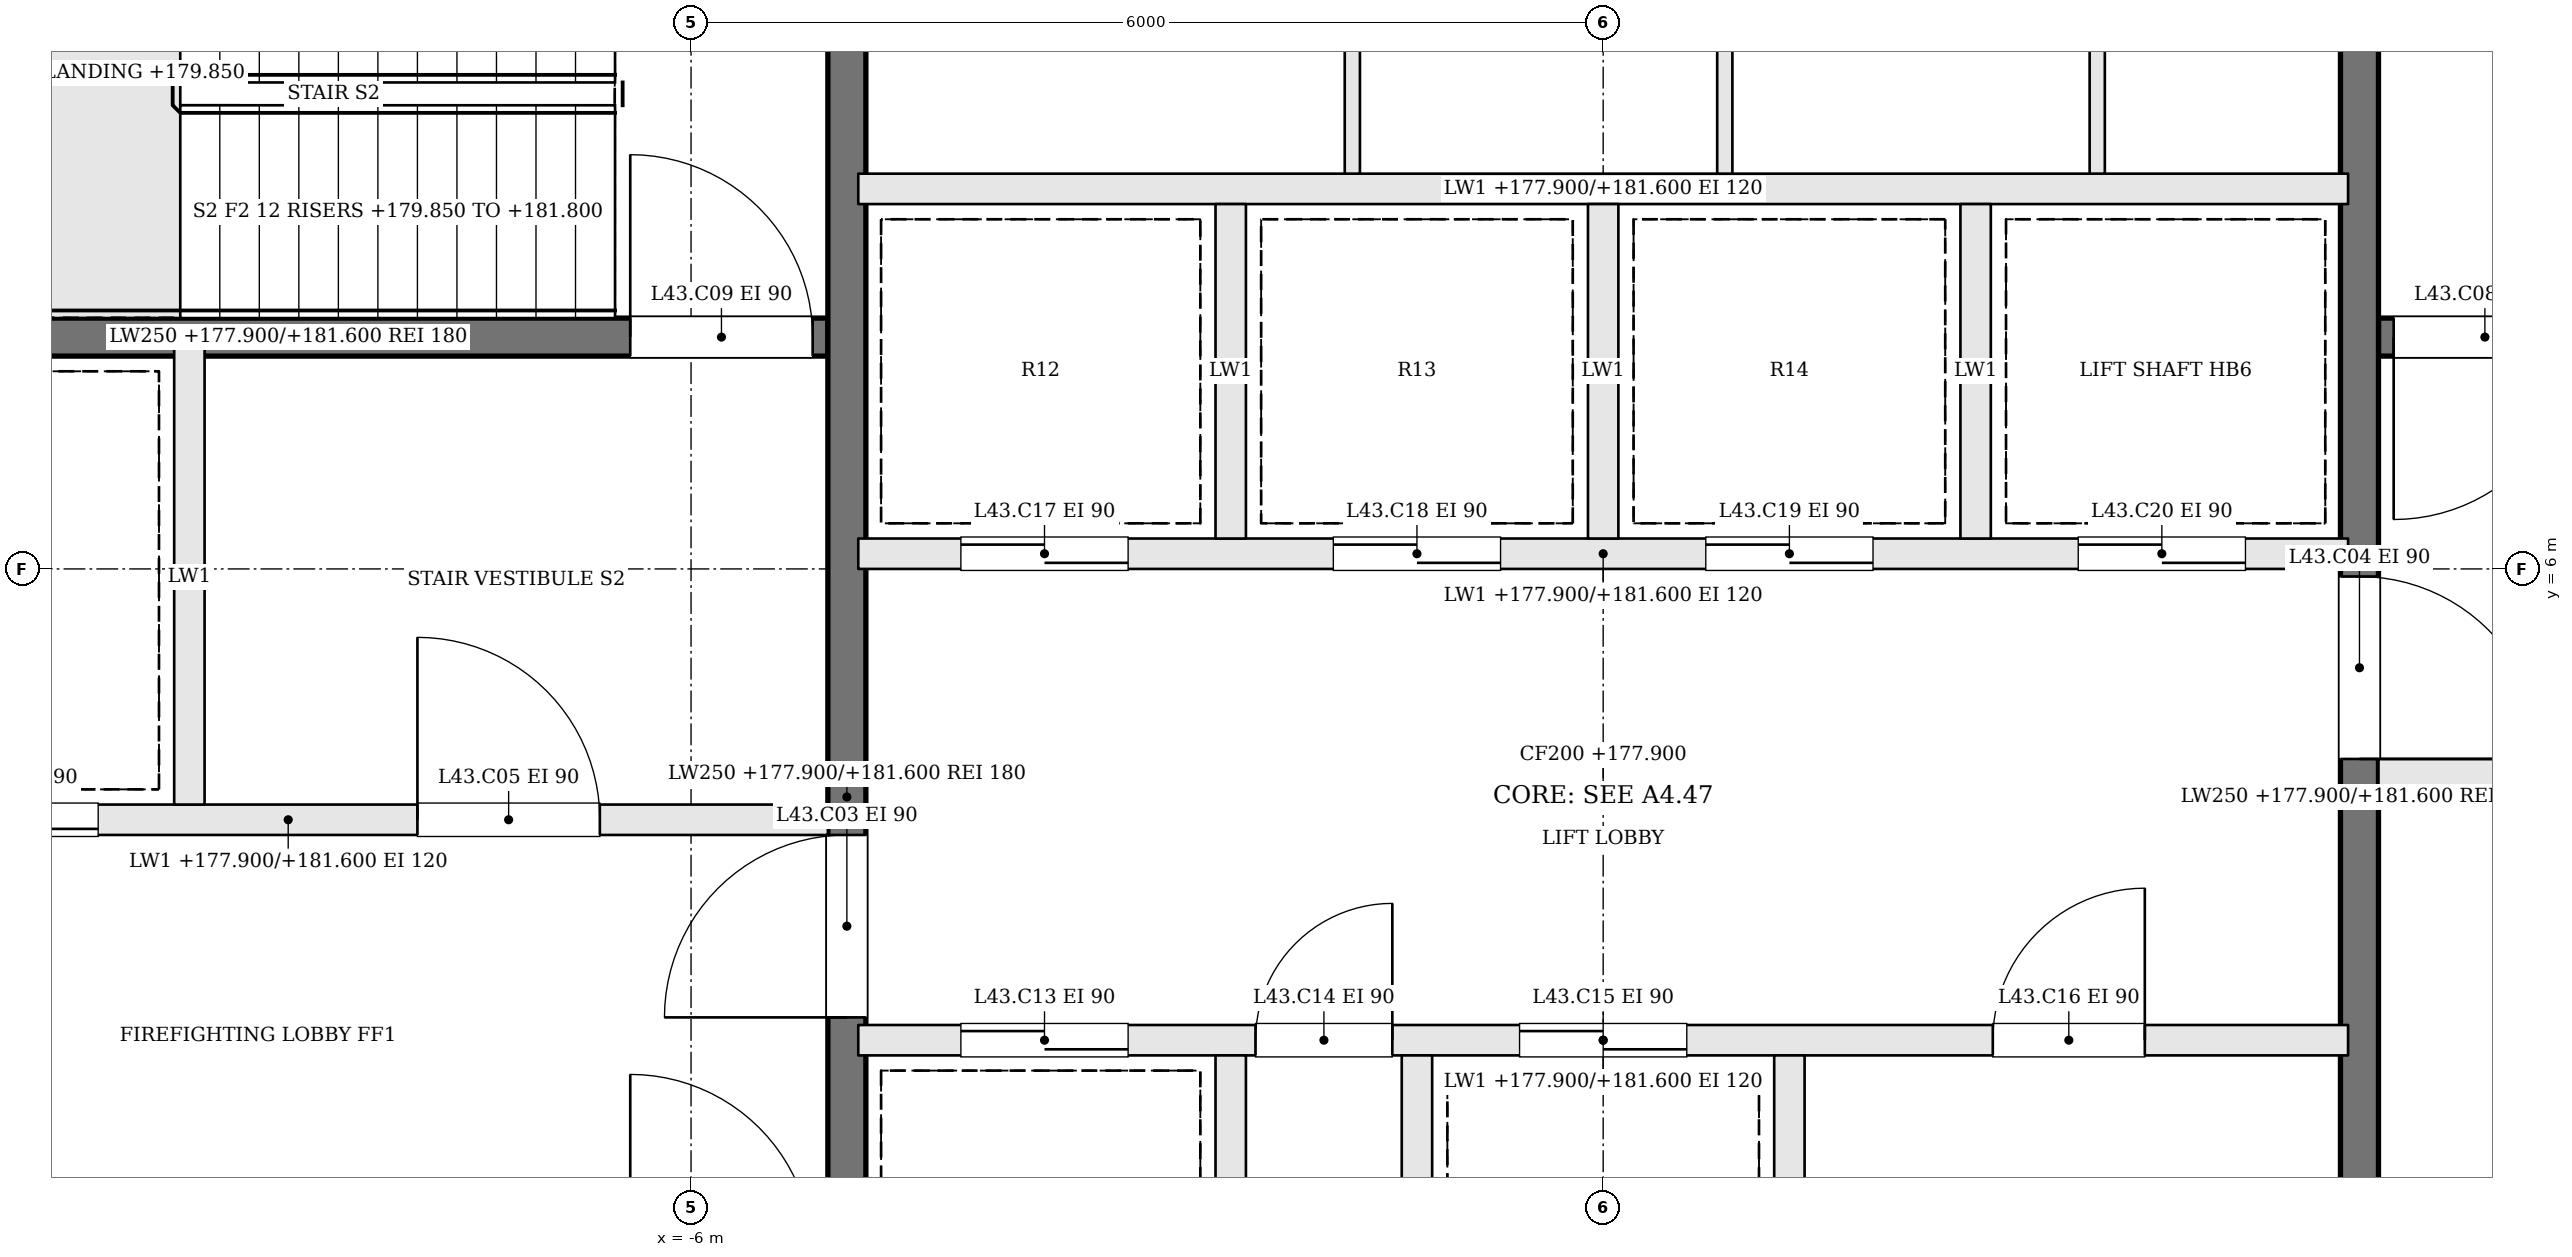
"""IFC4 building model, lengths in metres.
Left out: names, types, materials, properties, quantities, classifications, styles, units other than length and angle.
Written with IfcOpenShell. Run it as: python <this file> out.ifc"""

import sys

from ifc_helpers import new_model, si_unit, direction, frame, frame_2d, origin, place, context, subcontext, project, spatial, rectangle, extrude, element, fill, save


model = new_model("IFC4")
c1 = context("Model", 3, precision=1e-05, world=origin(), true_north=direction((0.0, 1.0)))
c2 = subcontext(c1, "Body", "Model", "MODEL_VIEW")
j1 = project(units=[si_unit("LENGTHUNIT", "METRE"), si_unit("PLANEANGLEUNIT", "RADIAN")], contexts=[c1])
p1 = place(None, origin())
s1 = spatial("IfcSite", under=j1, at=p1, CompositionType="ELEMENT")
p2 = place(p1, origin())
s2 = spatial("IfcBuilding", under=s1, at=p2, CompositionType="ELEMENT")
p3 = place(p2, frame((0.0, 0.0, 177.9)))
s3 = spatial("IfcBuildingStorey", under=s2, at=p3, CompositionType="ELEMENT", Elevation=177.9)
p4 = place(p3, frame((12.2, 7.525, 0.0), z_axis=(0.0, 0.0, 1.0), x_axis=(-1.0, 0.0, 0.0)))
e1 = element("IfcWall", 1, at=p4, inside=s3, PredefinedType="SOLIDWALL", context=c2, shape_type="SweptSolid", body=[
    extrude(rectangle(XDim=7.1, YDim=0.25, at=frame_2d((3.55, 0.0))), origin(), (0.0, 0.0, 1.0), 3.7),
])
p5 = place(p4, frame((5.8, 0.0, 0.0)))
e2 = element("IfcOpeningElement", 2, at=p5, cuts=e1, PredefinedType="OPENING", context=c2, shape_type="SweptSolid", body=[
    extrude(rectangle(XDim=1.2, YDim=2.1, at=frame_2d((0.6, 1.05))), frame((0.0, 0.135, 0.0), z_axis=(0.0, -1.0, 0.0), x_axis=(1.0, 0.0, 0.0)), (0.0, 0.0, 1.0), 0.27),
])
p6 = place(p3, frame((-12.2, 4.35, 0.0), z_axis=(0.0, 0.0, 1.0), x_axis=(1.0, 0.0, 0.0)))
e3 = element("IfcWall", 3, at=p6, inside=s3, PredefinedType="SOLIDWALL", context=c2, shape_type="SweptSolid", body=[
    extrude(rectangle(XDim=7.1, YDim=0.2, at=frame_2d((3.55, 0.0))), origin(), (0.0, 0.0, 1.0), 3.7),
])
p7 = place(p6, frame((4.4, 0.0, 0.0)))
e4 = element("IfcOpeningElement", 4, at=p7, cuts=e3, PredefinedType="OPENING", context=c2, shape_type="SweptSolid", body=[
    extrude(rectangle(XDim=1.2, YDim=2.1, at=frame_2d((0.6, 1.05))), frame((0.0, 0.11, 0.0), z_axis=(0.0, -1.0, 0.0), x_axis=(1.0, 0.0, 0.0)), (0.0, 0.0, 1.0), 0.22),
])
p8 = place(p6, frame((1.1, 0.0, 0.0)))
e5 = element("IfcOpeningElement", 5, at=p8, cuts=e3, PredefinedType="OPENING", context=c2, shape_type="SweptSolid", body=[
    extrude(rectangle(XDim=1.2, YDim=2.1, at=frame_2d((0.6, 1.05))), frame((0.0, 0.11, 0.0), z_axis=(0.0, -1.0, 0.0), x_axis=(1.0, 0.0, 0.0)), (0.0, 0.0, 1.0), 0.22),
])
p9 = place(p3, frame((12.2, 4.65, 0.0), z_axis=(0.0, 0.0, 1.0), x_axis=(-1.0, 0.0, 0.0)))
e6 = element("IfcWall", 6, at=p9, inside=s3, PredefinedType="SOLIDWALL", context=c2, shape_type="SweptSolid", body=[
    extrude(rectangle(XDim=7.1, YDim=0.2, at=frame_2d((3.55, 0.0))), origin(), (0.0, 0.0, 1.0), 3.7),
])
p10 = place(p9, frame((4.4, 0.0, 0.0)))
e7 = element("IfcOpeningElement", 7, at=p10, cuts=e6, PredefinedType="OPENING", context=c2, shape_type="SweptSolid", body=[
    extrude(rectangle(XDim=1.2, YDim=2.1, at=frame_2d((0.6, 1.05))), frame((0.0, 0.11, 0.0), z_axis=(0.0, -1.0, 0.0), x_axis=(1.0, 0.0, 0.0)), (0.0, 0.0, 1.0), 0.22),
])
p11 = place(p9, frame((1.1, 0.0, 0.0)))
e8 = element("IfcOpeningElement", 8, at=p11, cuts=e6, PredefinedType="OPENING", context=c2, shape_type="SweptSolid", body=[
    extrude(rectangle(XDim=1.2, YDim=2.1, at=frame_2d((0.6, 1.05))), frame((0.0, 0.11, 0.0), z_axis=(0.0, -1.0, 0.0), x_axis=(1.0, 0.0, 0.0)), (0.0, 0.0, 1.0), 0.22),
])
p12 = place(p3, frame((-12.2, 7.525, 0.0), z_axis=(0.0, 0.0, 1.0), x_axis=(1.0, 0.0, 0.0)))
e9 = element("IfcWall", 9, at=p12, inside=s3, PredefinedType="SOLIDWALL", context=c2, shape_type="SweptSolid", body=[
    extrude(rectangle(XDim=7.1, YDim=0.25, at=frame_2d((3.55, 0.0))), origin(), (0.0, 0.0, 1.0), 3.7),
])
p13 = place(p12, frame((5.8, 0.0, 0.0)))
e10 = element("IfcOpeningElement", 10, at=p13, cuts=e9, PredefinedType="OPENING", context=c2, shape_type="SweptSolid", body=[
    extrude(rectangle(XDim=1.2, YDim=2.1, at=frame_2d((0.6, 1.05))), frame((0.0, 0.135, 0.0), z_axis=(0.0, -1.0, 0.0), x_axis=(1.0, 0.0, 0.0)), (0.0, 0.0, 1.0), 0.27),
])
p14 = place(p3, frame((-9.3, 4.45, 0.0), z_axis=(0.0, 0.0, 1.0), x_axis=(0.0, 1.0, 0.0)))
e11 = element("IfcWall", 11, at=p14, inside=s3, PredefinedType="SOLIDWALL", context=c2, shape_type="SweptSolid", body=[
    extrude(rectangle(XDim=3.0, YDim=0.2, at=frame_2d((1.5, 0.0))), origin(), (0.0, 0.0, 1.0), 3.7),
])
p15 = place(p3, frame((-4.975, -2.2, 0.0), z_axis=(0.0, 0.0, 1.0), x_axis=(0.0, 1.0, 0.0)))
e12 = element("IfcWall", 12, at=p15, inside=s3, PredefinedType="SOLIDWALL", context=c2, shape_type="SweptSolid", body=[
    extrude(rectangle(XDim=13.4, YDim=0.25, at=frame_2d((6.7, 0.0))), origin(), (0.0, 0.0, 1.0), 3.7),
])
p16 = place(p15, frame((5.25, 0.0, 0.0)))
e13 = element("IfcOpeningElement", 13, at=p16, cuts=e12, PredefinedType="OPENING", context=c2, shape_type="SweptSolid", body=[
    extrude(rectangle(XDim=1.2, YDim=2.1, at=frame_2d((0.6, 1.05))), frame((0.0, 0.135, 0.0), z_axis=(0.0, -1.0, 0.0), x_axis=(1.0, 0.0, 0.0)), (0.0, 0.0, 1.0), 0.27),
])
p17 = place(p3, frame((4.975, 11.2, 0.0), z_axis=(0.0, 0.0, 1.0), x_axis=(0.0, -1.0, 0.0)))
e14 = element("IfcWall", 14, at=p17, inside=s3, PredefinedType="SOLIDWALL", context=c2, shape_type="SweptSolid", body=[
    extrude(rectangle(XDim=13.4, YDim=0.25, at=frame_2d((6.7, 0.0))), origin(), (0.0, 0.0, 1.0), 3.7),
])
p18 = place(p17, frame((5.25, 0.0, 0.0)))
e15 = element("IfcOpeningElement", 15, at=p18, cuts=e14, PredefinedType="OPENING", context=c2, shape_type="SweptSolid", body=[
    extrude(rectangle(XDim=1.2, YDim=2.1, at=frame_2d((0.6, 1.05))), frame((0.0, 0.135, 0.0), z_axis=(0.0, -1.0, 0.0), x_axis=(1.0, 0.0, 0.0)), (0.0, 0.0, 1.0), 0.27),
])
p19 = place(p3, frame((-4.9, 2.9, 0.0), z_axis=(0.0, 0.0, 1.0), x_axis=(1.0, 0.0, 0.0)))
e16 = element("IfcWall", 16, at=p19, inside=s3, PredefinedType="SOLIDWALL", context=c2, shape_type="SweptSolid", body=[
    extrude(rectangle(XDim=9.8, YDim=0.2, at=frame_2d((4.9, 0.0))), origin(), (0.0, 0.0, 1.0), 3.7),
])
p20 = place(p19, frame((0.675, 0.0, 0.0)))
e17 = element("IfcOpeningElement", 17, at=p20, cuts=e16, PredefinedType="OPENING", context=c2, shape_type="SweptSolid", body=[
    extrude(rectangle(XDim=1.1, YDim=2.1, at=frame_2d((0.55, 1.05))), frame((0.0, 0.11, 0.0), z_axis=(0.0, -1.0, 0.0), x_axis=(1.0, 0.0, 0.0)), (0.0, 0.0, 1.0), 0.22),
])
p21 = place(p19, frame((2.613, 0.0, 0.0)))
e18 = element("IfcOpeningElement", 18, at=p21, cuts=e16, PredefinedType="OPENING", context=c2, shape_type="SweptSolid", body=[
    extrude(rectangle(XDim=0.9, YDim=2.1, at=frame_2d((0.45, 1.05))), frame((0.0, 0.11, 0.0), z_axis=(0.0, -1.0, 0.0), x_axis=(1.0, 0.0, 0.0)), (0.0, 0.0, 1.0), 0.22),
])
p22 = place(p19, frame((4.35, 0.0, 0.0)))
e19 = element("IfcOpeningElement", 19, at=p22, cuts=e16, PredefinedType="OPENING", context=c2, shape_type="SweptSolid", body=[
    extrude(rectangle(XDim=1.1, YDim=2.1, at=frame_2d((0.55, 1.05))), frame((0.0, 0.11, 0.0), z_axis=(0.0, -1.0, 0.0), x_axis=(1.0, 0.0, 0.0)), (0.0, 0.0, 1.0), 0.22),
])
p23 = place(p19, frame((7.463, 0.0, 0.0)))
e20 = element("IfcOpeningElement", 20, at=p23, cuts=e16, PredefinedType="OPENING", context=c2, shape_type="SweptSolid", body=[
    extrude(rectangle(XDim=1.0, YDim=2.1, at=frame_2d((0.5, 1.05))), frame((0.0, 0.11, 0.0), z_axis=(0.0, -1.0, 0.0), x_axis=(1.0, 0.0, 0.0)), (0.0, 0.0, 1.0), 0.22),
])
p24 = place(p3, frame((-4.9, 6.1, 0.0), z_axis=(0.0, 0.0, 1.0), x_axis=(1.0, 0.0, 0.0)))
e21 = element("IfcWall", 21, at=p24, inside=s3, PredefinedType="SOLIDWALL", context=c2, shape_type="SweptSolid", body=[
    extrude(rectangle(XDim=9.8, YDim=0.2, at=frame_2d((4.9, 0.0))), origin(), (0.0, 0.0, 1.0), 3.7),
])
p25 = place(p24, frame((0.675, 0.0, 0.0)))
e22 = element("IfcOpeningElement", 22, at=p25, cuts=e21, PredefinedType="OPENING", context=c2, shape_type="SweptSolid", body=[
    extrude(rectangle(XDim=1.1, YDim=2.1, at=frame_2d((0.55, 1.05))), frame((0.0, 0.11, 0.0), z_axis=(0.0, -1.0, 0.0), x_axis=(1.0, 0.0, 0.0)), (0.0, 0.0, 1.0), 0.22),
])
p26 = place(p24, frame((3.125, 0.0, 0.0)))
e23 = element("IfcOpeningElement", 23, at=p26, cuts=e21, PredefinedType="OPENING", context=c2, shape_type="SweptSolid", body=[
    extrude(rectangle(XDim=1.1, YDim=2.1, at=frame_2d((0.55, 1.05))), frame((0.0, 0.11, 0.0), z_axis=(0.0, -1.0, 0.0), x_axis=(1.0, 0.0, 0.0)), (0.0, 0.0, 1.0), 0.22),
])
p27 = place(p24, frame((5.575, 0.0, 0.0)))
e24 = element("IfcOpeningElement", 24, at=p27, cuts=e21, PredefinedType="OPENING", context=c2, shape_type="SweptSolid", body=[
    extrude(rectangle(XDim=1.1, YDim=2.1, at=frame_2d((0.55, 1.05))), frame((0.0, 0.11, 0.0), z_axis=(0.0, -1.0, 0.0), x_axis=(1.0, 0.0, 0.0)), (0.0, 0.0, 1.0), 0.22),
])
p28 = place(p24, frame((8.025, 0.0, 0.0)))
e25 = element("IfcOpeningElement", 25, at=p28, cuts=e21, PredefinedType="OPENING", context=c2, shape_type="SweptSolid", body=[
    extrude(rectangle(XDim=1.1, YDim=2.1, at=frame_2d((0.55, 1.05))), frame((0.0, 0.11, 0.0), z_axis=(0.0, -1.0, 0.0), x_axis=(1.0, 0.0, 0.0)), (0.0, 0.0, 1.0), 0.22),
])
p29 = place(p3, frame((-4.9, 8.5, 0.0), z_axis=(0.0, 0.0, 1.0), x_axis=(1.0, 0.0, 0.0)))
e26 = element("IfcWall", 26, at=p29, inside=s3, PredefinedType="SOLIDWALL", context=c2, shape_type="SweptSolid", body=[
    extrude(rectangle(XDim=9.8, YDim=0.2, at=frame_2d((4.9, 0.0))), origin(), (0.0, 0.0, 1.0), 3.7),
])
for number, where, z_axis, x_axis in (
    (27, (-2.45, 0.6, 0.0), (0.0, 0.0, 1.0), (0.0, 1.0, 0.0)),
    (28, (-1.225, 0.6, 0.0), (0.0, 0.0, 1.0), (0.0, 1.0, 0.0)),
    (29, (1.225, 0.6, 0.0), (0.0, 0.0, 1.0), (0.0, 1.0, 0.0)),
    (30, (-2.45, 6.2, 0.0), (0.0, 0.0, 1.0), (0.0, 1.0, 0.0)),
    (31, (0.0, 6.2, 0.0), (0.0, 0.0, 1.0), (0.0, 1.0, 0.0)),
    (32, (2.45, 6.2, 0.0), (0.0, 0.0, 1.0), (0.0, 1.0, 0.0)),
):
    element("IfcWall", number, at=place(p3, frame(where, z_axis=z_axis, x_axis=x_axis)), inside=s3, PredefinedType="SOLIDWALL", context=c2, shape_type="SweptSolid", body=[
        extrude(rectangle(XDim=2.2, YDim=0.2, at=frame_2d((1.1, 0.0))), origin(), (0.0, 0.0, 1.0), 3.7),
    ])
for number, where, z_axis, x_axis in (
    (33, (-1.65, 8.6, 0.0), (0.0, 0.0, 1.0), (0.0, 1.0, 0.0)),
    (34, (0.8, 8.6, 0.0), (0.0, 0.0, 1.0), (0.0, 1.0, 0.0)),
    (35, (3.25, 8.6, 0.0), (0.0, 0.0, 1.0), (0.0, 1.0, 0.0)),
):
    element("IfcWall", number, at=place(p3, frame(where, z_axis=z_axis, x_axis=x_axis)), inside=s3, PredefinedType="PARTITIONING", context=c2, shape_type="SweptSolid", body=[
        extrude(rectangle(XDim=2.6, YDim=0.1, at=frame_2d((1.3, 0.0))), origin(), (0.0, 0.0, 1.0), 3.7),
    ])
p30 = place(p16, origin())
e36 = element("IfcDoor", 36, at=p30, inside=s3, OperationType="SINGLE_SWING_LEFT", PredefinedType="DOOR", context=c2, shape_type="SweptSolid", body=[
    extrude(rectangle(XDim=1.2, YDim=2.1, at=frame_2d((0.6, 1.05))), frame((0.0, 0.025, 0.0), z_axis=(0.0, -1.0, 0.0), x_axis=(1.0, 0.0, 0.0)), (0.0, 0.0, 1.0), 0.05),
])
fill(e13, e36)
p31 = place(p18, origin())
e37 = element("IfcDoor", 37, at=p31, inside=s3, OperationType="SINGLE_SWING_RIGHT", PredefinedType="DOOR", context=c2, shape_type="SweptSolid", body=[
    extrude(rectangle(XDim=1.2, YDim=2.1, at=frame_2d((0.6, 1.05))), frame((0.0, 0.025, 0.0), z_axis=(0.0, -1.0, 0.0), x_axis=(1.0, 0.0, 0.0)), (0.0, 0.0, 1.0), 0.05),
])
fill(e15, e37)
p32 = place(p7, origin())
e38 = element("IfcDoor", 38, at=p32, inside=s3, OperationType="SINGLE_SWING_LEFT", PredefinedType="DOOR", context=c2, shape_type="SweptSolid", body=[
    extrude(rectangle(XDim=1.2, YDim=2.1, at=frame_2d((0.6, 1.05))), frame((0.0, 0.025, 0.0), z_axis=(0.0, -1.0, 0.0), x_axis=(1.0, 0.0, 0.0)), (0.0, 0.0, 1.0), 0.05),
])
fill(e4, e38)
p33 = place(p5, origin())
e39 = element("IfcDoor", 39, at=p33, inside=s3, OperationType="SINGLE_SWING_RIGHT", PredefinedType="DOOR", context=c2, shape_type="SweptSolid", body=[
    extrude(rectangle(XDim=1.2, YDim=2.1, at=frame_2d((0.6, 1.05))), frame((0.0, 0.025, 0.0), z_axis=(0.0, -1.0, 0.0), x_axis=(1.0, 0.0, 0.0)), (0.0, 0.0, 1.0), 0.05),
])
fill(e2, e39)
p34 = place(p13, origin())
e40 = element("IfcDoor", 40, at=p34, inside=s3, OperationType="SINGLE_SWING_LEFT", PredefinedType="DOOR", context=c2, shape_type="SweptSolid", body=[
    extrude(rectangle(XDim=1.2, YDim=2.1, at=frame_2d((0.6, 1.05))), frame((0.0, 0.025, 0.0), z_axis=(0.0, -1.0, 0.0), x_axis=(1.0, 0.0, 0.0)), (0.0, 0.0, 1.0), 0.05),
])
fill(e10, e40)
p35 = place(p8, origin())
e41 = element("IfcDoor", 41, at=p35, inside=s3, OperationType="SLIDING_TO_RIGHT", PredefinedType="DOOR", context=c2, shape_type="SweptSolid", body=[
    extrude(rectangle(XDim=1.2, YDim=2.1, at=frame_2d((0.6, 1.05))), frame((0.0, 0.025, 0.0), z_axis=(0.0, -1.0, 0.0), x_axis=(1.0, 0.0, 0.0)), (0.0, 0.0, 1.0), 0.05),
])
fill(e5, e41)
p36 = place(p20, origin())
e42 = element("IfcDoor", 42, at=p36, inside=s3, OperationType="SLIDING_TO_RIGHT", PredefinedType="DOOR", context=c2, shape_type="SweptSolid", body=[
    extrude(rectangle(XDim=1.1, YDim=2.1, at=frame_2d((0.55, 1.05))), frame((0.0, 0.025, 0.0), z_axis=(0.0, -1.0, 0.0), x_axis=(1.0, 0.0, 0.0)), (0.0, 0.0, 1.0), 0.05),
])
fill(e17, e42)
p37 = place(p21, origin())
e43 = element("IfcDoor", 43, at=p37, inside=s3, OperationType="SINGLE_SWING_RIGHT", PredefinedType="DOOR", context=c2, shape_type="SweptSolid", body=[
    extrude(rectangle(XDim=0.9, YDim=2.1, at=frame_2d((0.45, 1.05))), frame((0.0, 0.025, 0.0), z_axis=(0.0, -1.0, 0.0), x_axis=(1.0, 0.0, 0.0)), (0.0, 0.0, 1.0), 0.05),
])
fill(e18, e43)
p38 = place(p22, origin())
e44 = element("IfcDoor", 44, at=p38, inside=s3, OperationType="SLIDING_TO_LEFT", PredefinedType="DOOR", context=c2, shape_type="SweptSolid", body=[
    extrude(rectangle(XDim=1.1, YDim=2.1, at=frame_2d((0.55, 1.05))), frame((0.0, 0.025, 0.0), z_axis=(0.0, -1.0, 0.0), x_axis=(1.0, 0.0, 0.0)), (0.0, 0.0, 1.0), 0.05),
])
fill(e19, e44)
p39 = place(p23, origin())
e45 = element("IfcDoor", 45, at=p39, inside=s3, OperationType="SINGLE_SWING_RIGHT", PredefinedType="DOOR", context=c2, shape_type="SweptSolid", body=[
    extrude(rectangle(XDim=1.0, YDim=2.1, at=frame_2d((0.5, 1.05))), frame((0.0, 0.025, 0.0), z_axis=(0.0, -1.0, 0.0), x_axis=(1.0, 0.0, 0.0)), (0.0, 0.0, 1.0), 0.05),
])
fill(e20, e45)
p40 = place(p25, origin())
e46 = element("IfcDoor", 46, at=p40, inside=s3, OperationType="SLIDING_TO_RIGHT", PredefinedType="DOOR", context=c2, shape_type="SweptSolid", body=[
    extrude(rectangle(XDim=1.1, YDim=2.1, at=frame_2d((0.55, 1.05))), frame((0.0, 0.025, 0.0), z_axis=(0.0, -1.0, 0.0), x_axis=(1.0, 0.0, 0.0)), (0.0, 0.0, 1.0), 0.05),
])
fill(e22, e46)
p41 = place(p26, origin())
e47 = element("IfcDoor", 47, at=p41, inside=s3, OperationType="SLIDING_TO_LEFT", PredefinedType="DOOR", context=c2, shape_type="SweptSolid", body=[
    extrude(rectangle(XDim=1.1, YDim=2.1, at=frame_2d((0.55, 1.05))), frame((0.0, 0.025, 0.0), z_axis=(0.0, -1.0, 0.0), x_axis=(1.0, 0.0, 0.0)), (0.0, 0.0, 1.0), 0.05),
])
fill(e23, e47)
p42 = place(p27, origin())
e48 = element("IfcDoor", 48, at=p42, inside=s3, OperationType="SLIDING_TO_RIGHT", PredefinedType="DOOR", context=c2, shape_type="SweptSolid", body=[
    extrude(rectangle(XDim=1.1, YDim=2.1, at=frame_2d((0.55, 1.05))), frame((0.0, 0.025, 0.0), z_axis=(0.0, -1.0, 0.0), x_axis=(1.0, 0.0, 0.0)), (0.0, 0.0, 1.0), 0.05),
])
fill(e24, e48)
p43 = place(p28, origin())
e49 = element("IfcDoor", 49, at=p43, inside=s3, OperationType="SLIDING_TO_LEFT", PredefinedType="DOOR", context=c2, shape_type="SweptSolid", body=[
    extrude(rectangle(XDim=1.1, YDim=2.1, at=frame_2d((0.55, 1.05))), frame((0.0, 0.025, 0.0), z_axis=(0.0, -1.0, 0.0), x_axis=(1.0, 0.0, 0.0)), (0.0, 0.0, 1.0), 0.05),
])
fill(e25, e49)
save(model, sys.argv[1])
